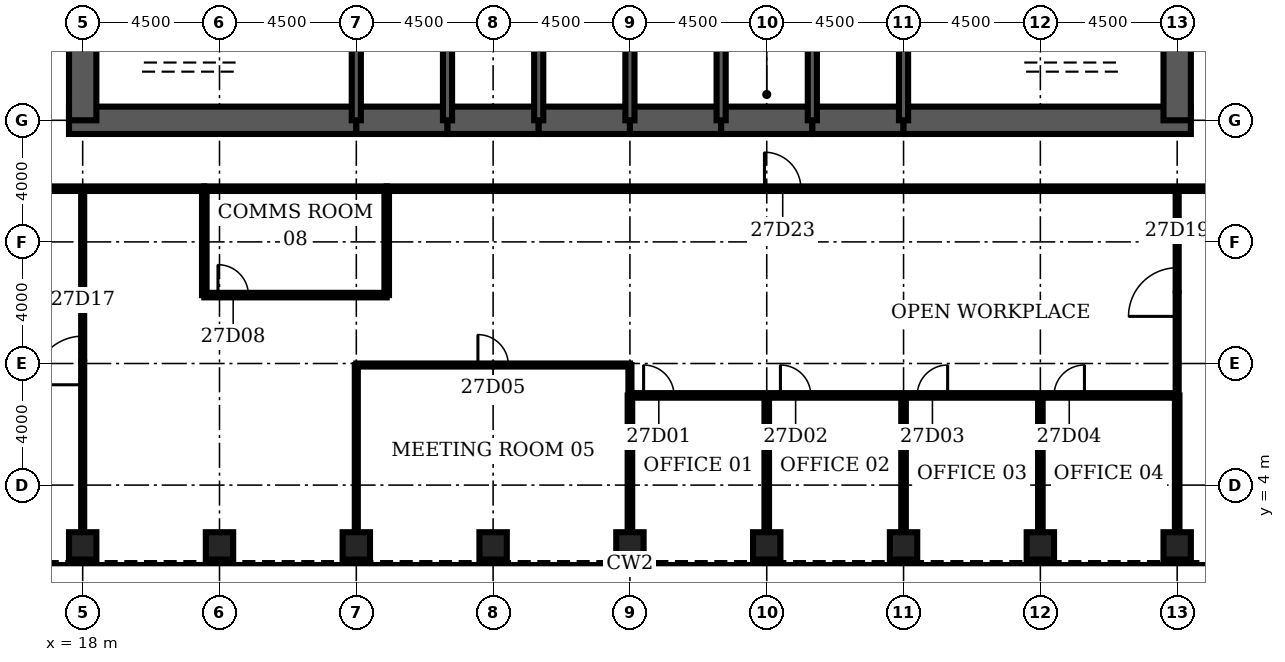
"""IFC4 building model, lengths in metres.
Left out: names, types, materials, properties, quantities, classifications, styles, units other than length and angle.
Written with IfcOpenShell. Run it as: python <this file> out.ifc"""

import sys

from ifc_helpers import new_model, si_unit, direction, frame, frame_2d, origin, origin_2d, place, context, subcontext, project, spatial, rectangle, hollow_rectangle, extrude, element, fill, save


model = new_model("IFC4")
c1 = context("Model", 3, precision=1e-05, world=origin(), true_north=direction((0.0, 1.0)))
c2 = subcontext(c1, "Body", "Model", "MODEL_VIEW")
j1 = project(units=[si_unit("LENGTHUNIT", "METRE"), si_unit("PLANEANGLEUNIT", "RADIAN")], contexts=[c1])
p1 = place(None, origin())
s1 = spatial("IfcSite", under=j1, at=p1, CompositionType="ELEMENT")
p2 = place(p1, origin())
s2 = spatial("IfcBuilding", under=s1, at=p2, CompositionType="ELEMENT")
p3 = place(p2, frame((0.0, 0.0, 125.7)))
s3 = spatial("IfcBuildingStorey", under=s2, at=p3, CompositionType="ELEMENT", Elevation=125.7)
for number, where, z_axis, x_axis in (
    (1, (18.0, 2.0, 0.0), (0.0, 0.0, 1.0), (0.0, 1.0, 0.0)),
    (2, (22.5, 2.0, 0.0), (0.0, 0.0, 1.0), (0.0, 1.0, 0.0)),
    (3, (27.0, 2.0, 0.0), (0.0, 0.0, 1.0), (0.0, 1.0, 0.0)),
    (4, (31.5, 2.0, 0.0), (0.0, 0.0, 1.0), (0.0, 1.0, 0.0)),
    (5, (36.0, 2.0, 0.0), (0.0, 0.0, 1.0), (0.0, 1.0, 0.0)),
    (6, (40.5, 2.0, 0.0), (0.0, 0.0, 1.0), (0.0, 1.0, 0.0)),
    (7, (45.0, 2.0, 0.0), (0.0, 0.0, 1.0), (0.0, 1.0, 0.0)),
    (8, (49.5, 2.0, 0.0), (0.0, 0.0, 1.0), (0.0, 1.0, 0.0)),
    (9, (54.0, 2.0, 0.0), (0.0, 0.0, 1.0), (0.0, 1.0, 0.0)),
):
    element("IfcColumn", number, at=place(p3, frame(where, z_axis=z_axis, x_axis=x_axis)), inside=s3, PredefinedType="COLUMN", context=c2, shape_type="SweptSolid", body=[
        extrude(hollow_rectangle(XDim=0.9, YDim=0.9, WallThickness=0.1, at=origin_2d()), origin(), (0.0, 0.0, 1.0), 4.2),
    ])
p4 = place(p3, frame((17.55, 16.0, 0.0), z_axis=(0.0, 0.0, 1.0), x_axis=(1.0, 0.0, 0.0)))
e10 = element("IfcWall", 10, at=p4, inside=s3, PredefinedType="SHEAR", context=c2, shape_type="SweptSolid", body=[
    extrude(rectangle(XDim=9.45, YDim=0.9, at=frame_2d((4.725, 0.0))), origin(), (0.0, 0.0, 1.0), 4.2),
])
for number, where, z_axis, x_axis in (
    (11, (27.0, 16.0, 0.0), (0.0, 0.0, 1.0), (1.0, 0.0, 0.0)),
    (12, (30.0, 16.0, 0.0), (0.0, 0.0, 1.0), (1.0, 0.0, 0.0)),
    (13, (33.0, 16.0, 0.0), (0.0, 0.0, 1.0), (1.0, 0.0, 0.0)),
    (14, (36.0, 16.0, 0.0), (0.0, 0.0, 1.0), (1.0, 0.0, 0.0)),
    (15, (39.0, 16.0, 0.0), (0.0, 0.0, 1.0), (1.0, 0.0, 0.0)),
    (16, (42.0, 16.0, 0.0), (0.0, 0.0, 1.0), (1.0, 0.0, 0.0)),
):
    element("IfcWall", number, at=place(p3, frame(where, z_axis=z_axis, x_axis=x_axis)), inside=s3, PredefinedType="SHEAR", context=c2, shape_type="SweptSolid", body=[
        extrude(rectangle(XDim=3.0, YDim=0.9, at=frame_2d((1.5, 0.0))), origin(), (0.0, 0.0, 1.0), 4.2),
    ])
p5 = place(p3, frame((45.0, 16.0, 0.0), z_axis=(0.0, 0.0, 1.0), x_axis=(1.0, 0.0, 0.0)))
e17 = element("IfcWall", 17, at=p5, inside=s3, PredefinedType="SHEAR", context=c2, shape_type="SweptSolid", body=[
    extrude(rectangle(XDim=9.45, YDim=0.9, at=frame_2d((4.725, 0.0))), origin(), (0.0, 0.0, 1.0), 4.2),
])
for number, where, z_axis, x_axis in (
    (18, (18.0, 19.2, 0.0), (0.0, 0.0, 1.0), (0.0, -1.0, 0.0)),
    (19, (54.0, 16.0, 0.0), (0.0, 0.0, 1.0), (0.0, 1.0, 0.0)),
):
    element("IfcWall", number, at=place(p3, frame(where, z_axis=z_axis, x_axis=x_axis)), inside=s3, PredefinedType="SHEAR", context=c2, shape_type="SweptSolid", body=[
        extrude(rectangle(XDim=3.2, YDim=0.9, at=frame_2d((1.6, 0.0))), origin(), (0.0, 0.0, 1.0), 4.2),
    ])
for number, where, z_axis, x_axis in (
    (20, (27.0, 16.0, 0.0), (0.0, 0.0, 1.0), (0.0, 1.0, 0.0)),
    (21, (30.0, 16.0, 0.0), (0.0, 0.0, 1.0), (0.0, 1.0, 0.0)),
    (22, (33.0, 16.0, 0.0), (0.0, 0.0, 1.0), (0.0, 1.0, 0.0)),
    (23, (36.0, 16.0, 0.0), (0.0, 0.0, 1.0), (0.0, 1.0, 0.0)),
    (24, (39.0, 16.0, 0.0), (0.0, 0.0, 1.0), (0.0, 1.0, 0.0)),
    (25, (42.0, 16.0, 0.0), (0.0, 0.0, 1.0), (0.0, 1.0, 0.0)),
    (26, (45.0, 16.0, 0.0), (0.0, 0.0, 1.0), (0.0, 1.0, 0.0)),
):
    element("IfcWall", number, at=place(p3, frame(where, z_axis=z_axis, x_axis=x_axis)), inside=s3, PredefinedType="SOLIDWALL", context=c2, shape_type="SweptSolid", body=[
        extrude(rectangle(XDim=3.2, YDim=0.3, at=frame_2d((1.6, 0.0))), origin(), (0.0, 0.0, 1.0), 4.2),
    ])
p6 = place(p3, frame((39.15, 17.4, 0.0), z_axis=(0.0, 0.0, 1.0), x_axis=(1.0, 0.0, 0.0)))
e27 = element("IfcWall", 27, at=p6, inside=s3, PredefinedType="SOLIDWALL", context=c2, shape_type="SweptSolid", body=[
    extrude(rectangle(XDim=2.7, YDim=0.3, at=frame_2d((1.35, 0.0))), origin(), (0.0, 0.0, 1.0), 4.04),
])
p7 = place(p6, frame((0.85, 0.0, 0.0)))
e28 = element("IfcOpeningElement", 28, at=p7, cuts=e27, PredefinedType="OPENING", context=c2, shape_type="SweptSolid", body=[
    extrude(rectangle(XDim=1.0, YDim=2.1, at=frame_2d((0.5, 1.05))), frame((0.0, 0.16, 0.0), z_axis=(0.0, -1.0, 0.0), x_axis=(1.0, 0.0, 0.0)), (0.0, 0.0, 1.0), 0.32),
])
p8 = place(p3, frame((36.0, 6.95, 0.0), z_axis=(0.0, 0.0, 1.0), x_axis=(1.0, 0.0, 0.0)))
e29 = element("IfcWall", 29, at=p8, inside=s3, PredefinedType="PARTITIONING", context=c2, shape_type="SweptSolid", body=[
    extrude(rectangle(XDim=18.0, YDim=0.15, at=frame_2d((9.0, 0.0))), origin(), (0.0, 0.0, 1.0), 3.0),
])
p9 = place(p8, frame((0.45, 0.0, 0.0)))
e30 = element("IfcOpeningElement", 30, at=p9, cuts=e29, PredefinedType="OPENING", context=c2, shape_type="SweptSolid", body=[
    extrude(rectangle(XDim=1.0, YDim=2.1, at=frame_2d((0.5, 1.05))), frame((0.0, 0.085, 0.0), z_axis=(0.0, -1.0, 0.0), x_axis=(1.0, 0.0, 0.0)), (0.0, 0.0, 1.0), 0.17),
])
p10 = place(p8, frame((4.95, 0.0, 0.0)))
e31 = element("IfcOpeningElement", 31, at=p10, cuts=e29, PredefinedType="OPENING", context=c2, shape_type="SweptSolid", body=[
    extrude(rectangle(XDim=1.0, YDim=2.1, at=frame_2d((0.5, 1.05))), frame((0.0, 0.085, 0.0), z_axis=(0.0, -1.0, 0.0), x_axis=(1.0, 0.0, 0.0)), (0.0, 0.0, 1.0), 0.17),
])
p11 = place(p8, frame((9.45, 0.0, 0.0)))
e32 = element("IfcOpeningElement", 32, at=p11, cuts=e29, PredefinedType="OPENING", context=c2, shape_type="SweptSolid", body=[
    extrude(rectangle(XDim=1.0, YDim=2.1, at=frame_2d((0.5, 1.05))), frame((0.0, 0.085, 0.0), z_axis=(0.0, -1.0, 0.0), x_axis=(1.0, 0.0, 0.0)), (0.0, 0.0, 1.0), 0.17),
])
p12 = place(p8, frame((13.95, 0.0, 0.0)))
e33 = element("IfcOpeningElement", 33, at=p12, cuts=e29, PredefinedType="OPENING", context=c2, shape_type="SweptSolid", body=[
    extrude(rectangle(XDim=1.0, YDim=2.1, at=frame_2d((0.5, 1.05))), frame((0.0, 0.085, 0.0), z_axis=(0.0, -1.0, 0.0), x_axis=(1.0, 0.0, 0.0)), (0.0, 0.0, 1.0), 0.17),
])
p13 = place(p3, frame((27.0, 7.95, 0.0), z_axis=(0.0, 0.0, 1.0), x_axis=(1.0, 0.0, 0.0)))
e34 = element("IfcWall", 34, at=p13, inside=s3, PredefinedType="PARTITIONING", context=c2, shape_type="SweptSolid", body=[
    extrude(rectangle(XDim=9.0, YDim=0.1, at=frame_2d((4.5, 0.0))), origin(), (0.0, 0.0, 1.0), 3.0),
])
p14 = place(p13, frame((4.0, 0.0, 0.0)))
e35 = element("IfcOpeningElement", 35, at=p14, cuts=e34, PredefinedType="OPENING", context=c2, shape_type="SweptSolid", body=[
    extrude(rectangle(XDim=1.0, YDim=2.1, at=frame_2d((0.5, 1.05))), frame((0.0, 0.06, 0.0), z_axis=(0.0, -1.0, 0.0), x_axis=(1.0, 0.0, 0.0)), (0.0, 0.0, 1.0), 0.12),
])
p15 = place(p3, frame((22.0, 10.25, 0.0), z_axis=(0.0, 0.0, 1.0), x_axis=(1.0, 0.0, 0.0)))
e36 = element("IfcWall", 36, at=p15, inside=s3, PredefinedType="PARTITIONING", context=c2, shape_type="SweptSolid", body=[
    extrude(rectangle(XDim=6.0, YDim=0.15, at=frame_2d((3.0, 0.0))), origin(), (0.0, 0.0, 1.0), 3.0),
])
p16 = place(p15, frame((0.45, 0.0, 0.0)))
e37 = element("IfcOpeningElement", 37, at=p16, cuts=e36, PredefinedType="OPENING", context=c2, shape_type="SweptSolid", body=[
    extrude(rectangle(XDim=1.0, YDim=2.1, at=frame_2d((0.5, 1.05))), frame((0.0, 0.085, 0.0), z_axis=(0.0, -1.0, 0.0), x_axis=(1.0, 0.0, 0.0)), (0.0, 0.0, 1.0), 0.17),
])
p17 = place(p3, frame((15.15, 13.75, 0.0), z_axis=(0.0, 0.0, 1.0), x_axis=(1.0, 0.0, 0.0)))
e38 = element("IfcWall", 38, at=p17, inside=s3, PredefinedType="PARTITIONING", context=c2, shape_type="SweptSolid", body=[
    extrude(rectangle(XDim=6.85, YDim=0.15, at=frame_2d((3.425, 0.0))), origin(), (0.0, 0.0, 1.0), 3.0),
])
p18 = place(p3, frame((22.0, 13.75, 0.0), z_axis=(0.0, 0.0, 1.0), x_axis=(1.0, 0.0, 0.0)))
e39 = element("IfcWall", 39, at=p18, inside=s3, PredefinedType="PARTITIONING", context=c2, shape_type="SweptSolid", body=[
    extrude(rectangle(XDim=6.0, YDim=0.15, at=frame_2d((3.0, 0.0))), origin(), (0.0, 0.0, 1.0), 3.0),
])
p19 = place(p3, frame((28.0, 13.75, 0.0), z_axis=(0.0, 0.0, 1.0), x_axis=(1.0, 0.0, 0.0)))
e40 = element("IfcWall", 40, at=p19, inside=s3, PredefinedType="PARTITIONING", context=c2, shape_type="SweptSolid", body=[
    extrude(rectangle(XDim=28.85, YDim=0.15, at=frame_2d((14.425, 0.0))), origin(), (0.0, 0.0, 1.0), 3.0),
])
p20 = place(p19, frame((12.425, 0.0, 0.0)))
e41 = element("IfcOpeningElement", 41, at=p20, cuts=e40, PredefinedType="OPENING", context=c2, shape_type="SweptSolid", body=[
    extrude(rectangle(XDim=1.2, YDim=2.1, at=frame_2d((0.6, 1.05))), frame((0.0, 0.085, 0.0), z_axis=(0.0, -1.0, 0.0), x_axis=(1.0, 0.0, 0.0)), (0.0, 0.0, 1.0), 0.17),
])
p21 = place(p3, frame((18.0, 2.45, 0.0), z_axis=(0.0, 0.0, 1.0), x_axis=(0.0, 1.0, 0.0)))
e42 = element("IfcWall", 42, at=p21, inside=s3, PredefinedType="PARTITIONING", context=c2, shape_type="SweptSolid", body=[
    extrude(rectangle(XDim=11.3, YDim=0.1, at=frame_2d((5.65, 0.0))), origin(), (0.0, 0.0, 1.0), 3.0),
])
p22 = place(p21, frame((4.85, 0.0, 0.0)))
e43 = element("IfcOpeningElement", 43, at=p22, cuts=e42, PredefinedType="OPENING", context=c2, shape_type="SweptSolid", body=[
    extrude(rectangle(XDim=1.6, YDim=2.1, at=frame_2d((0.8, 1.05))), frame((0.0, 0.06, 0.0), z_axis=(0.0, -1.0, 0.0), x_axis=(1.0, 0.0, 0.0)), (0.0, 0.0, 1.0), 0.12),
])
p23 = place(p3, frame((22.0, 10.25, 0.0), z_axis=(0.0, 0.0, 1.0), x_axis=(0.0, 1.0, 0.0)))
e44 = element("IfcWall", 44, at=p23, inside=s3, PredefinedType="PARTITIONING", context=c2, shape_type="SweptSolid", body=[
    extrude(rectangle(XDim=3.5, YDim=0.15, at=frame_2d((1.75, 0.0))), origin(), (0.0, 0.0, 1.0), 3.0),
])
p24 = place(p3, frame((27.0, 2.45, 0.0), z_axis=(0.0, 0.0, 1.0), x_axis=(0.0, 1.0, 0.0)))
e45 = element("IfcWall", 45, at=p24, inside=s3, PredefinedType="PARTITIONING", context=c2, shape_type="SweptSolid", body=[
    extrude(rectangle(XDim=5.5, YDim=0.1, at=frame_2d((2.75, 0.0))), origin(), (0.0, 0.0, 1.0), 3.0),
])
p25 = place(p3, frame((28.0, 10.25, 0.0), z_axis=(0.0, 0.0, 1.0), x_axis=(0.0, 1.0, 0.0)))
e46 = element("IfcWall", 46, at=p25, inside=s3, PredefinedType="PARTITIONING", context=c2, shape_type="SweptSolid", body=[
    extrude(rectangle(XDim=3.5, YDim=0.15, at=frame_2d((1.75, 0.0))), origin(), (0.0, 0.0, 1.0), 3.0),
])
p26 = place(p3, frame((36.0, 2.45, 0.0), z_axis=(0.0, 0.0, 1.0), x_axis=(0.0, 1.0, 0.0)))
e47 = element("IfcWall", 47, at=p26, inside=s3, PredefinedType="PARTITIONING", context=c2, shape_type="SweptSolid", body=[
    extrude(rectangle(XDim=4.5, YDim=0.15, at=frame_2d((2.25, 0.0))), origin(), (0.0, 0.0, 1.0), 3.0),
])
p27 = place(p3, frame((36.0, 6.95, 0.0), z_axis=(0.0, 0.0, 1.0), x_axis=(0.0, 1.0, 0.0)))
e48 = element("IfcWall", 48, at=p27, inside=s3, PredefinedType="PARTITIONING", context=c2, shape_type="SweptSolid", body=[
    extrude(rectangle(XDim=1.0, YDim=0.1, at=frame_2d((0.5, 0.0))), origin(), (0.0, 0.0, 1.0), 3.0),
])
for number, where, z_axis, x_axis in (
    (49, (40.5, 2.45, 0.0), (0.0, 0.0, 1.0), (0.0, 1.0, 0.0)),
    (50, (45.0, 2.45, 0.0), (0.0, 0.0, 1.0), (0.0, 1.0, 0.0)),
    (51, (49.5, 2.45, 0.0), (0.0, 0.0, 1.0), (0.0, 1.0, 0.0)),
    (52, (54.0, 2.45, 0.0), (0.0, 0.0, 1.0), (0.0, 1.0, 0.0)),
):
    element("IfcWall", number, at=place(p3, frame(where, z_axis=z_axis, x_axis=x_axis)), inside=s3, PredefinedType="PARTITIONING", context=c2, shape_type="SweptSolid", body=[
        extrude(rectangle(XDim=4.5, YDim=0.15, at=frame_2d((2.25, 0.0))), origin(), (0.0, 0.0, 1.0), 3.0),
    ])
p28 = place(p3, frame((54.0, 6.95, 0.0), z_axis=(0.0, 0.0, 1.0), x_axis=(0.0, 1.0, 0.0)))
e53 = element("IfcWall", 53, at=p28, inside=s3, PredefinedType="PARTITIONING", context=c2, shape_type="SweptSolid", body=[
    extrude(rectangle(XDim=6.8, YDim=0.1, at=frame_2d((3.4, 0.0))), origin(), (0.0, 0.0, 1.0), 3.0),
])
p29 = place(p28, frame((2.6, 0.0, 0.0)))
e54 = element("IfcOpeningElement", 54, at=p29, cuts=e53, PredefinedType="OPENING", context=c2, shape_type="SweptSolid", body=[
    extrude(rectangle(XDim=1.6, YDim=2.1, at=frame_2d((0.8, 1.05))), frame((0.0, 0.06, 0.0), z_axis=(0.0, -1.0, 0.0), x_axis=(1.0, 0.0, 0.0)), (0.0, 0.0, 1.0), 0.12),
])
p30 = place(p7, origin())
e55 = element("IfcDoor", 55, at=p30, inside=s3, OperationType="SINGLE_SWING_LEFT", PredefinedType="DOOR", context=c2, shape_type="SweptSolid", body=[
    extrude(rectangle(XDim=1.0, YDim=2.1, at=frame_2d((0.5, 1.05))), frame((0.0, 0.025, 0.0), z_axis=(0.0, -1.0, 0.0), x_axis=(1.0, 0.0, 0.0)), (0.0, 0.0, 1.0), 0.05),
])
fill(e28, e55)
p31 = place(p9, origin())
e56 = element("IfcDoor", 56, at=p31, inside=s3, OperationType="SINGLE_SWING_LEFT", PredefinedType="DOOR", context=c2, shape_type="SweptSolid", body=[
    extrude(rectangle(XDim=1.0, YDim=2.1, at=frame_2d((0.5, 1.05))), frame((0.0, 0.025, 0.0), z_axis=(0.0, -1.0, 0.0), x_axis=(1.0, 0.0, 0.0)), (0.0, 0.0, 1.0), 0.05),
])
fill(e30, e56)
p32 = place(p10, origin())
e57 = element("IfcDoor", 57, at=p32, inside=s3, OperationType="SINGLE_SWING_LEFT", PredefinedType="DOOR", context=c2, shape_type="SweptSolid", body=[
    extrude(rectangle(XDim=1.0, YDim=2.1, at=frame_2d((0.5, 1.05))), frame((0.0, 0.025, 0.0), z_axis=(0.0, -1.0, 0.0), x_axis=(1.0, 0.0, 0.0)), (0.0, 0.0, 1.0), 0.05),
])
fill(e31, e57)
p33 = place(p11, origin())
e58 = element("IfcDoor", 58, at=p33, inside=s3, OperationType="SINGLE_SWING_RIGHT", PredefinedType="DOOR", context=c2, shape_type="SweptSolid", body=[
    extrude(rectangle(XDim=1.0, YDim=2.1, at=frame_2d((0.5, 1.05))), frame((0.0, 0.025, 0.0), z_axis=(0.0, -1.0, 0.0), x_axis=(1.0, 0.0, 0.0)), (0.0, 0.0, 1.0), 0.05),
])
fill(e32, e58)
p34 = place(p12, origin())
e59 = element("IfcDoor", 59, at=p34, inside=s3, OperationType="SINGLE_SWING_RIGHT", PredefinedType="DOOR", context=c2, shape_type="SweptSolid", body=[
    extrude(rectangle(XDim=1.0, YDim=2.1, at=frame_2d((0.5, 1.05))), frame((0.0, 0.025, 0.0), z_axis=(0.0, -1.0, 0.0), x_axis=(1.0, 0.0, 0.0)), (0.0, 0.0, 1.0), 0.05),
])
fill(e33, e59)
p35 = place(p14, origin())
e60 = element("IfcDoor", 60, at=p35, inside=s3, OperationType="SINGLE_SWING_LEFT", PredefinedType="DOOR", context=c2, shape_type="SweptSolid", body=[
    extrude(rectangle(XDim=1.0, YDim=2.1, at=frame_2d((0.5, 1.05))), frame((0.0, 0.025, 0.0), z_axis=(0.0, -1.0, 0.0), x_axis=(1.0, 0.0, 0.0)), (0.0, 0.0, 1.0), 0.05),
])
fill(e35, e60)
p36 = place(p16, origin())
e61 = element("IfcDoor", 61, at=p36, inside=s3, OperationType="SINGLE_SWING_LEFT", PredefinedType="DOOR", context=c2, shape_type="SweptSolid", body=[
    extrude(rectangle(XDim=1.0, YDim=2.1, at=frame_2d((0.5, 1.05))), frame((0.0, 0.025, 0.0), z_axis=(0.0, -1.0, 0.0), x_axis=(1.0, 0.0, 0.0)), (0.0, 0.0, 1.0), 0.05),
])
fill(e37, e61)
p37 = place(p22, origin())
e62 = element("IfcDoor", 62, at=p37, inside=s3, OperationType="SINGLE_SWING_LEFT", PredefinedType="DOOR", context=c2, shape_type="SweptSolid", body=[
    extrude(rectangle(XDim=1.6, YDim=2.1, at=frame_2d((0.8, 1.05))), frame((0.0, 0.025, 0.0), z_axis=(0.0, -1.0, 0.0), x_axis=(1.0, 0.0, 0.0)), (0.0, 0.0, 1.0), 0.05),
])
fill(e43, e62)
p38 = place(p29, origin())
e63 = element("IfcDoor", 63, at=p38, inside=s3, OperationType="SINGLE_SWING_LEFT", PredefinedType="DOOR", context=c2, shape_type="SweptSolid", body=[
    extrude(rectangle(XDim=1.6, YDim=2.1, at=frame_2d((0.8, 1.05))), frame((0.0, 0.025, 0.0), z_axis=(0.0, -1.0, 0.0), x_axis=(1.0, 0.0, 0.0)), (0.0, 0.0, 1.0), 0.05),
])
fill(e54, e63)
p39 = place(p20, origin())
e64 = element("IfcDoor", 64, at=p39, inside=s3, OperationType="SINGLE_SWING_LEFT", PredefinedType="DOOR", context=c2, shape_type="SweptSolid", body=[
    extrude(rectangle(XDim=1.2, YDim=2.1, at=frame_2d((0.6, 1.05))), frame((0.0, 0.025, 0.0), z_axis=(0.0, -1.0, 0.0), x_axis=(1.0, 0.0, 0.0)), (0.0, 0.0, 1.0), 0.05),
])
fill(e41, e64)
save(model, sys.argv[1])
